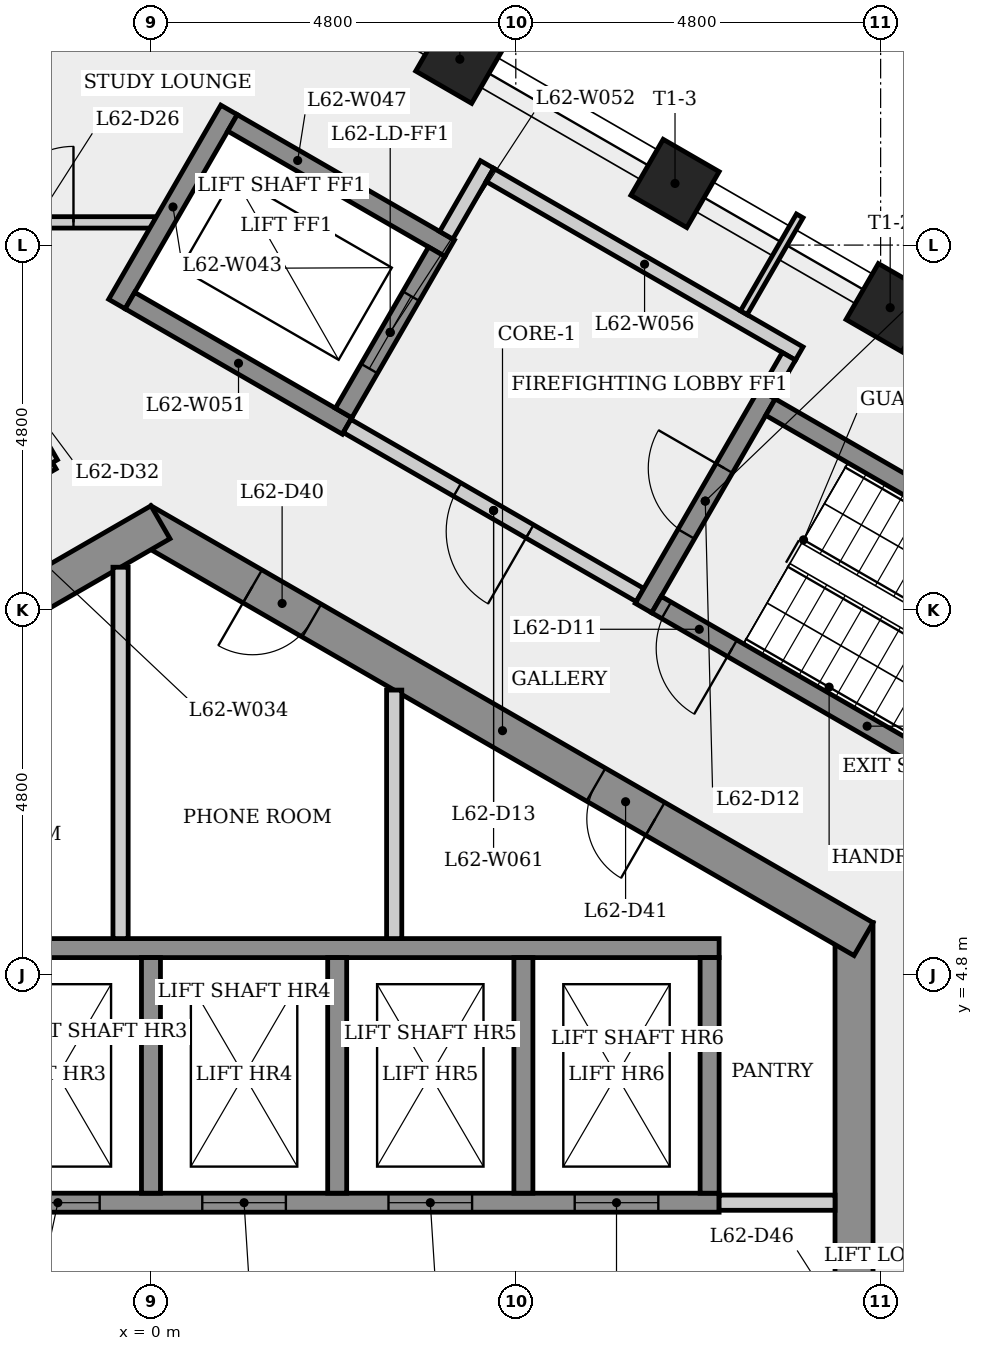
"""IFC4 building model, lengths in metres.
Left out: names, types, materials, properties, quantities, classifications, styles, units other than length and angle.
Written with IfcOpenShell. Run it as: python <this file> out.ifc"""

import sys

from ifc_helpers import new_model, si_unit, direction, frame, frame_2d, origin, origin_2d, place, context, subcontext, project, spatial, rectangle, extrude, element, fill, save


model = new_model("IFC4")
c1 = context("Model", 3, precision=1e-05, world=origin(), true_north=direction((0.0, 1.0)))
c2 = subcontext(c1, "Body", "Model", "MODEL_VIEW")
j1 = project(units=[si_unit("LENGTHUNIT", "METRE"), si_unit("PLANEANGLEUNIT", "RADIAN")], contexts=[c1])
p1 = place(None, origin())
s1 = spatial("IfcSite", under=j1, at=p1, CompositionType="ELEMENT")
p2 = place(p1, origin())
s2 = spatial("IfcBuilding", under=s1, at=p2, CompositionType="ELEMENT")
p3 = place(p2, frame((0.0, 0.0, 232.5)))
s3 = spatial("IfcBuildingStorey", under=s2, at=p3, CompositionType="ELEMENT", Elevation=232.5)
p4 = place(p3, frame((9.25, -5.485, 0.0), z_axis=(0.0, 0.0, 1.0), x_axis=(0.0, 1.0, 0.0)))
e1 = element("IfcWall", 1, at=p4, inside=s3, PredefinedType="SHEAR", context=c2, shape_type="SweptSolid", body=[
    extrude(rectangle(XDim=10.97, YDim=0.5, at=frame_2d((5.485, 0.0))), origin(), (0.0, 0.0, 1.0), 3.4),
])
p5 = place(p4, frame((4.685, 0.0, 0.0)))
e2 = element("IfcOpeningElement", 2, at=p5, cuts=e1, PredefinedType="OPENING", context=c2, shape_type="SweptSolid", body=[
    extrude(rectangle(XDim=1.6, YDim=2.1, at=frame_2d((0.8, 1.05))), frame((0.0, 0.26, 0.0), z_axis=(0.0, -1.0, 0.0), x_axis=(1.0, 0.0, 0.0)), (0.0, 0.0, 1.0), 0.52),
])
p6 = place(p3, frame((9.375, 5.268, 0.0), z_axis=(0.0, 0.0, 1.0), x_axis=(-0.866023993627, 0.500002442456, 0.0)))
e3 = element("IfcWall", 3, at=p6, inside=s3, PredefinedType="SHEAR", context=c2, shape_type="SweptSolid", body=[
    extrude(rectangle(XDim=10.97, YDim=0.5, at=frame_2d((5.485, 0.0))), origin(), (0.0, 0.0, 1.0), 3.4),
])
p7 = place(p6, frame((8.383, 0.0, 0.0)))
e4 = element("IfcOpeningElement", 4, at=p7, cuts=e3, PredefinedType="OPENING", context=c2, shape_type="SweptSolid", body=[
    extrude(rectangle(XDim=0.9, YDim=2.1, at=frame_2d((0.45, 1.05))), frame((0.0, 0.26, 0.0), z_axis=(0.0, -1.0, 0.0), x_axis=(1.0, 0.0, 0.0)), (0.0, 0.0, 1.0), 0.52),
])
p8 = place(p6, frame((3.165, 0.0, 0.0)))
e5 = element("IfcOpeningElement", 5, at=p8, cuts=e3, PredefinedType="OPENING", context=c2, shape_type="SweptSolid", body=[
    extrude(rectangle(XDim=0.9, YDim=2.1, at=frame_2d((0.45, 1.05))), frame((0.0, 0.26, 0.0), z_axis=(0.0, -1.0, 0.0), x_axis=(1.0, 0.0, 0.0)), (0.0, 0.0, 1.0), 0.52),
])
p9 = place(p3, frame((0.125, 10.753, 0.0), z_axis=(0.0, 0.0, 1.0), x_axis=(-0.866023993627, -0.500002442456, 0.0)))
e6 = element("IfcWall", 6, at=p9, inside=s3, PredefinedType="SHEAR", context=c2, shape_type="SweptSolid", body=[
    extrude(rectangle(XDim=10.97, YDim=0.5, at=frame_2d((5.485, 0.0))), origin(), (0.0, 0.0, 1.0), 3.4),
])
p10 = place(p9, frame((9.043, 0.0, 0.0)))
e7 = element("IfcOpeningElement", 7, at=p10, cuts=e6, PredefinedType="OPENING", context=c2, shape_type="SweptSolid", body=[
    extrude(rectangle(XDim=0.9, YDim=2.1, at=frame_2d((0.45, 1.05))), frame((0.0, 0.26, 0.0), z_axis=(0.0, -1.0, 0.0), x_axis=(1.0, 0.0, 0.0)), (0.0, 0.0, 1.0), 0.52),
])
p11 = place(p9, frame((2.38, 0.0, 0.0)))
e8 = element("IfcOpeningElement", 8, at=p11, cuts=e6, PredefinedType="OPENING", context=c2, shape_type="SweptSolid", body=[
    extrude(rectangle(XDim=0.9, YDim=2.1, at=frame_2d((0.45, 1.05))), frame((0.0, 0.26, 0.0), z_axis=(0.0, -1.0, 0.0), x_axis=(1.0, 0.0, 0.0)), (0.0, 0.0, 1.0), 0.52),
])
for number, where, z_axis, x_axis in (
    (9, (9.726, 13.576, 0.0), (0.0, 0.0, 1.0), (0.5, 0.866, 0.0)),
    (10, (6.895, 15.211, 0.0), (0.0, 0.0, 1.0), (0.5, 0.866, 0.0)),
    (11, (4.064, 16.845, 0.0), (0.0, 0.0, 1.0), (0.5, 0.866, 0.0)),
):
    element("IfcColumn", number, at=place(p3, frame(where, z_axis=z_axis, x_axis=x_axis)), inside=s3, PredefinedType="COLUMN", context=c2, shape_type="SweptSolid", body=[
        extrude(rectangle(XDim=0.85, YDim=0.85, at=origin_2d()), origin(), (0.0, 0.0, 1.0), 3.4),
    ])
p12 = place(p3, frame((-9.269, 6.912, 0.0), z_axis=(0.0, 0.0, 1.0), x_axis=(0.866021065666, 0.500007513767, 0.0)))
e12 = element("IfcWall", 12, at=p12, inside=s3, PredefinedType="PARTITIONING", context=c2, shape_type="SweptSolid", body=[
    extrude(rectangle(XDim=9.218, YDim=0.15, at=frame_2d((4.609, 0.0))), origin(), (0.0, 0.0, 1.0), 3.05),
])
p13 = place(p12, frame((3.321, 0.0, 0.0)))
e13 = element("IfcOpeningElement", 13, at=p13, cuts=e12, PredefinedType="OPENING", context=c2, shape_type="SweptSolid", body=[
    extrude(rectangle(XDim=0.9, YDim=2.1, at=frame_2d((0.45, 1.05))), frame((0.0, 0.085, 0.0), z_axis=(0.0, -1.0, 0.0), x_axis=(1.0, 0.0, 0.0)), (0.0, 0.0, 1.0), 0.17),
])
p14 = place(p12, frame((1.824, 0.0, 0.0)))
e14 = element("IfcOpeningElement", 14, at=p14, cuts=e12, PredefinedType="OPENING", context=c2, shape_type="SweptSolid", body=[
    extrude(rectangle(XDim=0.9, YDim=2.1, at=frame_2d((0.45, 1.05))), frame((0.0, 0.085, 0.0), z_axis=(0.0, -1.0, 0.0), x_axis=(1.0, 0.0, 0.0)), (0.0, 0.0, 1.0), 0.17),
])
p15 = place(p3, frame((-7.475, 1.8, 0.0), z_axis=(0.0, 0.0, 1.0), x_axis=(1.0, 0.0, 0.0)))
e15 = element("IfcWall", 15, at=p15, inside=s3, PredefinedType="SHEAR", context=c2, shape_type="SweptSolid", body=[
    extrude(rectangle(XDim=14.95, YDim=0.25, at=frame_2d((7.475, 0.0))), origin(), (0.0, 0.0, 1.0), 3.05),
])
p16 = place(p15, frame((0.8, 0.0, 0.0)))
e16 = element("IfcOpeningElement", 16, at=p16, cuts=e15, PredefinedType="OPENING", context=c2, shape_type="SweptSolid", body=[
    extrude(rectangle(XDim=1.1, YDim=2.1, at=frame_2d((0.55, 1.05))), frame((0.0, 0.135, 0.0), z_axis=(0.0, -1.0, 0.0), x_axis=(1.0, 0.0, 0.0)), (0.0, 0.0, 1.0), 0.27),
])
p17 = place(p15, frame((3.25, 0.0, 0.0)))
e17 = element("IfcOpeningElement", 17, at=p17, cuts=e15, PredefinedType="OPENING", context=c2, shape_type="SweptSolid", body=[
    extrude(rectangle(XDim=1.1, YDim=2.1, at=frame_2d((0.55, 1.05))), frame((0.0, 0.135, 0.0), z_axis=(0.0, -1.0, 0.0), x_axis=(1.0, 0.0, 0.0)), (0.0, 0.0, 1.0), 0.27),
])
p18 = place(p15, frame((5.7, 0.0, 0.0)))
e18 = element("IfcOpeningElement", 18, at=p18, cuts=e15, PredefinedType="OPENING", context=c2, shape_type="SweptSolid", body=[
    extrude(rectangle(XDim=1.1, YDim=2.1, at=frame_2d((0.55, 1.05))), frame((0.0, 0.135, 0.0), z_axis=(0.0, -1.0, 0.0), x_axis=(1.0, 0.0, 0.0)), (0.0, 0.0, 1.0), 0.27),
])
p19 = place(p15, frame((8.15, 0.0, 0.0)))
e19 = element("IfcOpeningElement", 19, at=p19, cuts=e15, PredefinedType="OPENING", context=c2, shape_type="SweptSolid", body=[
    extrude(rectangle(XDim=1.1, YDim=2.1, at=frame_2d((0.55, 1.05))), frame((0.0, 0.135, 0.0), z_axis=(0.0, -1.0, 0.0), x_axis=(1.0, 0.0, 0.0)), (0.0, 0.0, 1.0), 0.27),
])
p20 = place(p15, frame((10.6, 0.0, 0.0)))
e20 = element("IfcOpeningElement", 20, at=p20, cuts=e15, PredefinedType="OPENING", context=c2, shape_type="SweptSolid", body=[
    extrude(rectangle(XDim=1.1, YDim=2.1, at=frame_2d((0.55, 1.05))), frame((0.0, 0.135, 0.0), z_axis=(0.0, -1.0, 0.0), x_axis=(1.0, 0.0, 0.0)), (0.0, 0.0, 1.0), 0.27),
])
p21 = place(p15, frame((13.05, 0.0, 0.0)))
e21 = element("IfcOpeningElement", 21, at=p21, cuts=e15, PredefinedType="OPENING", context=c2, shape_type="SweptSolid", body=[
    extrude(rectangle(XDim=1.1, YDim=2.1, at=frame_2d((0.55, 1.05))), frame((0.0, 0.135, 0.0), z_axis=(0.0, -1.0, 0.0), x_axis=(1.0, 0.0, 0.0)), (0.0, 0.0, 1.0), 0.27),
])
p22 = place(p3, frame((-7.225, 5.15, 0.0), z_axis=(0.0, 0.0, 1.0), x_axis=(1.0, 0.0, 0.0)))
e22 = element("IfcWall", 22, at=p22, inside=s3, PredefinedType="SHEAR", context=c2, shape_type="SweptSolid", body=[
    extrude(rectangle(XDim=14.7, YDim=0.25, at=frame_2d((7.35, 0.0))), origin(), (0.0, 0.0, 1.0), 3.05),
])
p23 = place(p3, frame((-3.196, 14.699, 0.0), z_axis=(0.0, 0.0, 1.0), x_axis=(1.0, 0.0, 0.0)))
e23 = element("IfcWall", 23, at=p23, inside=s3, PredefinedType="PARTITIONING", context=c2, shape_type="SweptSolid", body=[
    extrude(rectangle(XDim=3.244, YDim=0.15, at=frame_2d((1.622, 0.0))), origin(), (0.0, 0.0, 1.0), 3.05),
])
p24 = place(p23, frame((1.177, 0.0, 0.0)))
e24 = element("IfcOpeningElement", 24, at=p24, cuts=e23, PredefinedType="OPENING", context=c2, shape_type="SweptSolid", body=[
    extrude(rectangle(XDim=1.0, YDim=2.1, at=frame_2d((0.5, 1.05))), frame((0.0, 0.085, 0.0), z_axis=(0.0, -1.0, 0.0), x_axis=(1.0, 0.0, 0.0)), (0.0, 0.0, 1.0), 0.17),
])
p25 = place(p3, frame((-1.464, 11.829, 0.0), z_axis=(0.0, 0.0, 1.0), x_axis=(0.499806183056, -0.866137275136, 0.0)))
e25 = element("IfcWall", 25, at=p25, inside=s3, PredefinedType="PARTITIONING", context=c2, shape_type="SweptSolid", body=[
    extrude(rectangle(XDim=0.337, YDim=0.15, at=frame_2d((0.168, 0.0))), origin(), (0.0, 0.0, 1.0), 3.05),
])
p26 = place(p3, frame((-0.4, 10.161, 0.0), z_axis=(0.0, 0.0, 1.0), x_axis=(0.0, -1.0, 0.0)))
e26 = element("IfcWall", 26, at=p26, inside=s3, PredefinedType="PARTITIONING", context=c2, shape_type="SweptSolid", body=[
    extrude(rectangle(XDim=4.886, YDim=0.2, at=frame_2d((2.443, 0.0))), origin(), (0.0, 0.0, 1.0), 3.05),
])
p27 = place(p3, frame((-0.448, 13.624, 0.0), z_axis=(0.0, 0.0, 1.0), x_axis=(0.500037662692, 0.866003658127, 0.0)))
e27 = element("IfcWall", 27, at=p27, inside=s3, PredefinedType="SHEAR", context=c2, shape_type="SweptSolid", body=[
    extrude(rectangle(XDim=2.95, YDim=0.25, at=frame_2d((1.475, 0.0))), origin(), (0.0, 0.0, 1.0), 3.05),
])
p28 = place(p3, frame((0.0, 5.025, 0.0), z_axis=(0.0, 0.0, 1.0), x_axis=(0.0, -1.0, 0.0)))
e28 = element("IfcWall", 28, at=p28, inside=s3, PredefinedType="SHEAR", context=c2, shape_type="SweptSolid", body=[
    extrude(rectangle(XDim=3.1, YDim=0.25, at=frame_2d((1.55, 0.0))), origin(), (0.0, 0.0, 1.0), 3.4),
])
p29 = place(p3, frame((1.073, 16.008, 0.0), z_axis=(0.0, 0.0, 1.0), x_axis=(0.866040211805, -0.499974350878, 0.0)))
e29 = element("IfcWall", 29, at=p29, inside=s3, PredefinedType="SHEAR", context=c2, shape_type="SweptSolid", body=[
    extrude(rectangle(XDim=3.3, YDim=0.25, at=frame_2d((1.65, 0.0))), origin(), (0.0, 0.0, 1.0), 3.05),
])
p30 = place(p3, frame((2.45, 5.025, 0.0), z_axis=(0.0, 0.0, 1.0), x_axis=(0.0, -1.0, 0.0)))
e30 = element("IfcWall", 30, at=p30, inside=s3, PredefinedType="SHEAR", context=c2, shape_type="SweptSolid", body=[
    extrude(rectangle(XDim=3.1, YDim=0.25, at=frame_2d((1.55, 0.0))), origin(), (0.0, 0.0, 1.0), 3.4),
])
p31 = place(p3, frame((2.581, 12.02, 0.0), z_axis=(0.0, 0.0, 1.0), x_axis=(-0.866040211805, 0.499974350878, 0.0)))
e31 = element("IfcWall", 31, at=p31, inside=s3, PredefinedType="SHEAR", context=c2, shape_type="SweptSolid", body=[
    extrude(rectangle(XDim=3.3, YDim=0.25, at=frame_2d((1.65, 0.0))), origin(), (0.0, 0.0, 1.0), 3.05),
])
p32 = place(p3, frame((2.535, 12.191, 0.0), z_axis=(0.0, 0.0, 1.0), x_axis=(0.500061746146, 0.865989751695, 0.0)))
e32 = element("IfcWall", 32, at=p32, inside=s3, PredefinedType="SHEAR", context=c2, shape_type="SweptSolid", body=[
    extrude(rectangle(XDim=2.45, YDim=0.25, at=frame_2d((1.225, 0.0))), origin(), (0.0, 0.0, 1.0), 3.4),
])
p33 = place(p32, frame((0.675, 0.0, 0.0)))
e33 = element("IfcOpeningElement", 33, at=p33, cuts=e32, PredefinedType="OPENING", context=c2, shape_type="SweptSolid", body=[
    extrude(rectangle(XDim=1.1, YDim=2.1, at=frame_2d((0.55, 1.05))), frame((0.0, 0.135, 0.0), z_axis=(0.0, -1.0, 0.0), x_axis=(1.0, 0.0, 0.0)), (0.0, 0.0, 1.0), 0.27),
])
p34 = place(p3, frame((3.2, 8.545, 0.0), z_axis=(0.0, 0.0, 1.0), x_axis=(0.0, -1.0, 0.0)))
e34 = element("IfcWall", 34, at=p34, inside=s3, PredefinedType="PARTITIONING", context=c2, shape_type="SweptSolid", body=[
    extrude(rectangle(XDim=3.27, YDim=0.2, at=frame_2d((1.635, 0.0))), origin(), (0.0, 0.0, 1.0), 3.05),
])
p35 = place(p3, frame((3.885, 14.529, 0.0), z_axis=(0.0, 0.0, 1.0), x_axis=(0.499997628298, 0.866026773083, 0.0)))
e35 = element("IfcWall", 35, at=p35, inside=s3, PredefinedType="PARTITIONING", context=c2, shape_type="SweptSolid", body=[
    extrude(rectangle(XDim=1.075, YDim=0.2, at=frame_2d((0.538, 0.0))), origin(), (0.0, 0.0, 1.0), 3.05),
])
p36 = place(p3, frame((4.459, 15.323, 0.0), z_axis=(0.0, 0.0, 1.0), x_axis=(0.866016039709, -0.500016218704, 0.0)))
e36 = element("IfcWall", 36, at=p36, inside=s3, PredefinedType="PARTITIONING", context=c2, shape_type="SweptSolid", body=[
    extrude(rectangle(XDim=4.7, YDim=0.2, at=frame_2d((2.35, 0.0))), origin(), (0.0, 0.0, 1.0), 3.05),
])
p37 = place(p3, frame((4.9, 5.025, 0.0), z_axis=(0.0, 0.0, 1.0), x_axis=(0.0, -1.0, 0.0)))
e37 = element("IfcWall", 37, at=p37, inside=s3, PredefinedType="SHEAR", context=c2, shape_type="SweptSolid", body=[
    extrude(rectangle(XDim=3.1, YDim=0.25, at=frame_2d((1.55, 0.0))), origin(), (0.0, 0.0, 1.0), 3.4),
])
p38 = place(p3, frame((6.435, 9.795, 0.0), z_axis=(0.0, 0.0, 1.0), x_axis=(-0.866012907634, 0.500021643343, 0.0)))
e38 = element("IfcWall", 38, at=p38, inside=s3, PredefinedType="PARTITIONING", context=c2, shape_type="SweptSolid", body=[
    extrude(rectangle(XDim=4.45, YDim=0.2, at=frame_2d((2.225, 0.0))), origin(), (0.0, 0.0, 1.0), 3.05),
])
p39 = place(p38, frame((1.675, 0.0, 0.0)))
e39 = element("IfcOpeningElement", 39, at=p39, cuts=e38, PredefinedType="OPENING", context=c2, shape_type="SweptSolid", body=[
    extrude(rectangle(XDim=1.1, YDim=2.1, at=frame_2d((0.55, 1.05))), frame((0.0, 0.11, 0.0), z_axis=(0.0, -1.0, 0.0), x_axis=(1.0, 0.0, 0.0)), (0.0, 0.0, 1.0), 0.22),
])
p40 = place(p3, frame((6.48, 9.624, 0.0), z_axis=(0.0, 0.0, 1.0), x_axis=(0.500017246033, 0.866015446554, 0.0)))
e40 = element("IfcWall", 40, at=p40, inside=s3, PredefinedType="SHEAR", context=c2, shape_type="SweptSolid", body=[
    extrude(rectangle(XDim=3.25, YDim=0.25, at=frame_2d((1.625, 0.0))), origin(), (0.0, 0.0, 1.0), 3.05),
])
p41 = place(p40, frame((1.125, 0.0, 0.0)))
e41 = element("IfcOpeningElement", 41, at=p41, cuts=e40, PredefinedType="OPENING", context=c2, shape_type="SweptSolid", body=[
    extrude(rectangle(XDim=1.0, YDim=2.1, at=frame_2d((0.5, 1.05))), frame((0.0, 0.135, 0.0), z_axis=(0.0, -1.0, 0.0), x_axis=(1.0, 0.0, 0.0)), (0.0, 0.0, 1.0), 0.27),
])
p42 = place(p3, frame((7.475, 1.8, 0.0), z_axis=(0.0, 0.0, 1.0), x_axis=(1.0, 0.0, 0.0)))
e42 = element("IfcWall", 42, at=p42, inside=s3, PredefinedType="PARTITIONING", context=c2, shape_type="SweptSolid", body=[
    extrude(rectangle(XDim=1.525, YDim=0.2, at=frame_2d((0.763, 0.0))), origin(), (0.0, 0.0, 1.0), 3.05),
])
p43 = place(p3, frame((7.35, 5.025, 0.0), z_axis=(0.0, 0.0, 1.0), x_axis=(0.0, -1.0, 0.0)))
e43 = element("IfcWall", 43, at=p43, inside=s3, PredefinedType="SHEAR", context=c2, shape_type="SweptSolid", body=[
    extrude(rectangle(XDim=3.1, YDim=0.25, at=frame_2d((1.55, 0.0))), origin(), (0.0, 0.0, 1.0), 3.4),
])
p44 = place(p3, frame((7.8, 13.51, 0.0), z_axis=(0.0, 0.0, 1.0), x_axis=(0.500048082433, 0.865997641599, 0.0)))
e44 = element("IfcWall", 44, at=p44, inside=s3, PredefinedType="PARTITIONING", context=c2, shape_type="SweptSolid", body=[
    extrude(rectangle(XDim=1.471, YDim=0.1, at=frame_2d((0.735, 0.0))), origin(), (0.0, 0.0, 1.0), 3.05),
])
p45 = place(p3, frame((8.151, 12.268, 0.0), z_axis=(0.0, 0.0, 1.0), x_axis=(0.866025499775, -0.499999833739, 0.0)))
e45 = element("IfcWall", 45, at=p45, inside=s3, PredefinedType="SHEAR", context=c2, shape_type="SweptSolid", body=[
    extrude(rectangle(XDim=6.4, YDim=0.25, at=frame_2d((3.2, 0.0))), origin(), (0.0, 0.0, 1.0), 3.05),
])
p46 = place(p3, frame((8.393, 12.937, 0.0), z_axis=(0.0, 0.0, 1.0), x_axis=(-0.500065409566, -0.86598763626, 0.0)))
e46 = element("IfcWall", 46, at=p46, inside=s3, PredefinedType="PARTITIONING", context=c2, shape_type="SweptSolid", body=[
    extrude(rectangle(XDim=0.575, YDim=0.2, at=frame_2d((0.288, 0.0))), origin(), (0.0, 0.0, 1.0), 3.05),
])
p47 = place(p3, frame((12.194, 6.47, 0.0), z_axis=(0.0, 0.0, 1.0), x_axis=(-0.866025499775, 0.499999833739, 0.0)))
e47 = element("IfcWall", 47, at=p47, inside=s3, PredefinedType="SHEAR", context=c2, shape_type="SweptSolid", body=[
    extrude(rectangle(XDim=6.4, YDim=0.25, at=frame_2d((3.2, 0.0))), origin(), (0.0, 0.0, 1.0), 3.05),
])
p48 = place(p47, frame((5.25, 0.0, 0.0)))
e48 = element("IfcOpeningElement", 48, at=p48, cuts=e47, PredefinedType="OPENING", context=c2, shape_type="SweptSolid", body=[
    extrude(rectangle(XDim=1.0, YDim=2.1, at=frame_2d((0.5, 1.05))), frame((0.0, 0.135, 0.0), z_axis=(0.0, -1.0, 0.0), x_axis=(1.0, 0.0, 0.0)), (0.0, 0.0, 1.0), 0.27),
])
p49 = place(p18, origin())
e49 = element("IfcDoor", 49, at=p49, inside=s3, OperationType="SLIDING_TO_LEFT", PredefinedType="DOOR", context=c2, shape_type="SweptSolid", body=[
    extrude(rectangle(XDim=1.1, YDim=2.1, at=frame_2d((0.55, 1.05))), frame((0.0, 0.025, 0.0), z_axis=(0.0, -1.0, 0.0), x_axis=(1.0, 0.0, 0.0)), (0.0, 0.0, 1.0), 0.05),
])
fill(e18, e49)
p50 = place(p19, origin())
e50 = element("IfcDoor", 50, at=p50, inside=s3, OperationType="SLIDING_TO_LEFT", PredefinedType="DOOR", context=c2, shape_type="SweptSolid", body=[
    extrude(rectangle(XDim=1.1, YDim=2.1, at=frame_2d((0.55, 1.05))), frame((0.0, 0.025, 0.0), z_axis=(0.0, -1.0, 0.0), x_axis=(1.0, 0.0, 0.0)), (0.0, 0.0, 1.0), 0.05),
])
fill(e19, e50)
p51 = place(p20, origin())
e51 = element("IfcDoor", 51, at=p51, inside=s3, OperationType="SLIDING_TO_LEFT", PredefinedType="DOOR", context=c2, shape_type="SweptSolid", body=[
    extrude(rectangle(XDim=1.1, YDim=2.1, at=frame_2d((0.55, 1.05))), frame((0.0, 0.025, 0.0), z_axis=(0.0, -1.0, 0.0), x_axis=(1.0, 0.0, 0.0)), (0.0, 0.0, 1.0), 0.05),
])
fill(e20, e51)
p52 = place(p21, origin())
e52 = element("IfcDoor", 52, at=p52, inside=s3, OperationType="SLIDING_TO_LEFT", PredefinedType="DOOR", context=c2, shape_type="SweptSolid", body=[
    extrude(rectangle(XDim=1.1, YDim=2.1, at=frame_2d((0.55, 1.05))), frame((0.0, 0.025, 0.0), z_axis=(0.0, -1.0, 0.0), x_axis=(1.0, 0.0, 0.0)), (0.0, 0.0, 1.0), 0.05),
])
fill(e21, e52)
p53 = place(p48, origin())
e53 = element("IfcDoor", 53, at=p53, inside=s3, OperationType="SINGLE_SWING_LEFT", PredefinedType="DOOR", context=c2, shape_type="SweptSolid", body=[
    extrude(rectangle(XDim=1.0, YDim=2.1, at=frame_2d((0.5, 1.05))), frame((0.0, 0.025, 0.0), z_axis=(0.0, -1.0, 0.0), x_axis=(1.0, 0.0, 0.0)), (0.0, 0.0, 1.0), 0.05),
])
fill(e48, e53)
p54 = place(p41, origin())
e54 = element("IfcDoor", 54, at=p54, inside=s3, OperationType="SINGLE_SWING_RIGHT", PredefinedType="DOOR", context=c2, shape_type="SweptSolid", body=[
    extrude(rectangle(XDim=1.0, YDim=2.1, at=frame_2d((0.5, 1.05))), frame((0.0, 0.025, 0.0), z_axis=(0.0, -1.0, 0.0), x_axis=(1.0, 0.0, 0.0)), (0.0, 0.0, 1.0), 0.05),
])
fill(e41, e54)
p55 = place(p39, origin())
e55 = element("IfcDoor", 55, at=p55, inside=s3, OperationType="SINGLE_SWING_LEFT", PredefinedType="DOOR", context=c2, shape_type="SweptSolid", body=[
    extrude(rectangle(XDim=1.1, YDim=2.1, at=frame_2d((0.55, 1.05))), frame((0.0, 0.025, 0.0), z_axis=(0.0, -1.0, 0.0), x_axis=(1.0, 0.0, 0.0)), (0.0, 0.0, 1.0), 0.05),
])
fill(e39, e55)
p56 = place(p33, origin())
e56 = element("IfcDoor", 56, at=p56, inside=s3, OperationType="SLIDING_TO_LEFT", PredefinedType="DOOR", context=c2, shape_type="SweptSolid", body=[
    extrude(rectangle(XDim=1.1, YDim=2.1, at=frame_2d((0.55, 1.05))), frame((0.0, 0.025, 0.0), z_axis=(0.0, -1.0, 0.0), x_axis=(1.0, 0.0, 0.0)), (0.0, 0.0, 1.0), 0.05),
])
fill(e33, e56)
p57 = place(p24, origin())
e57 = element("IfcDoor", 57, at=p57, inside=s3, OperationType="SINGLE_SWING_RIGHT", PredefinedType="DOOR", context=c2, shape_type="SweptSolid", body=[
    extrude(rectangle(XDim=1.0, YDim=2.1, at=frame_2d((0.5, 1.05))), frame((0.0, 0.025, 0.0), z_axis=(0.0, -1.0, 0.0), x_axis=(1.0, 0.0, 0.0)), (0.0, 0.0, 1.0), 0.05),
])
fill(e24, e57)
p58 = place(p7, origin())
e58 = element("IfcDoor", 58, at=p58, inside=s3, OperationType="SINGLE_SWING_RIGHT", PredefinedType="DOOR", context=c2, shape_type="SweptSolid", body=[
    extrude(rectangle(XDim=0.9, YDim=2.1, at=frame_2d((0.45, 1.05))), frame((0.0, 0.025, 0.0), z_axis=(0.0, -1.0, 0.0), x_axis=(1.0, 0.0, 0.0)), (0.0, 0.0, 1.0), 0.05),
])
fill(e4, e58)
p59 = place(p8, origin())
e59 = element("IfcDoor", 59, at=p59, inside=s3, OperationType="SINGLE_SWING_LEFT", PredefinedType="DOOR", context=c2, shape_type="SweptSolid", body=[
    extrude(rectangle(XDim=0.9, YDim=2.1, at=frame_2d((0.45, 1.05))), frame((0.0, 0.025, 0.0), z_axis=(0.0, -1.0, 0.0), x_axis=(1.0, 0.0, 0.0)), (0.0, 0.0, 1.0), 0.05),
])
fill(e5, e59)
save(model, sys.argv[1])
